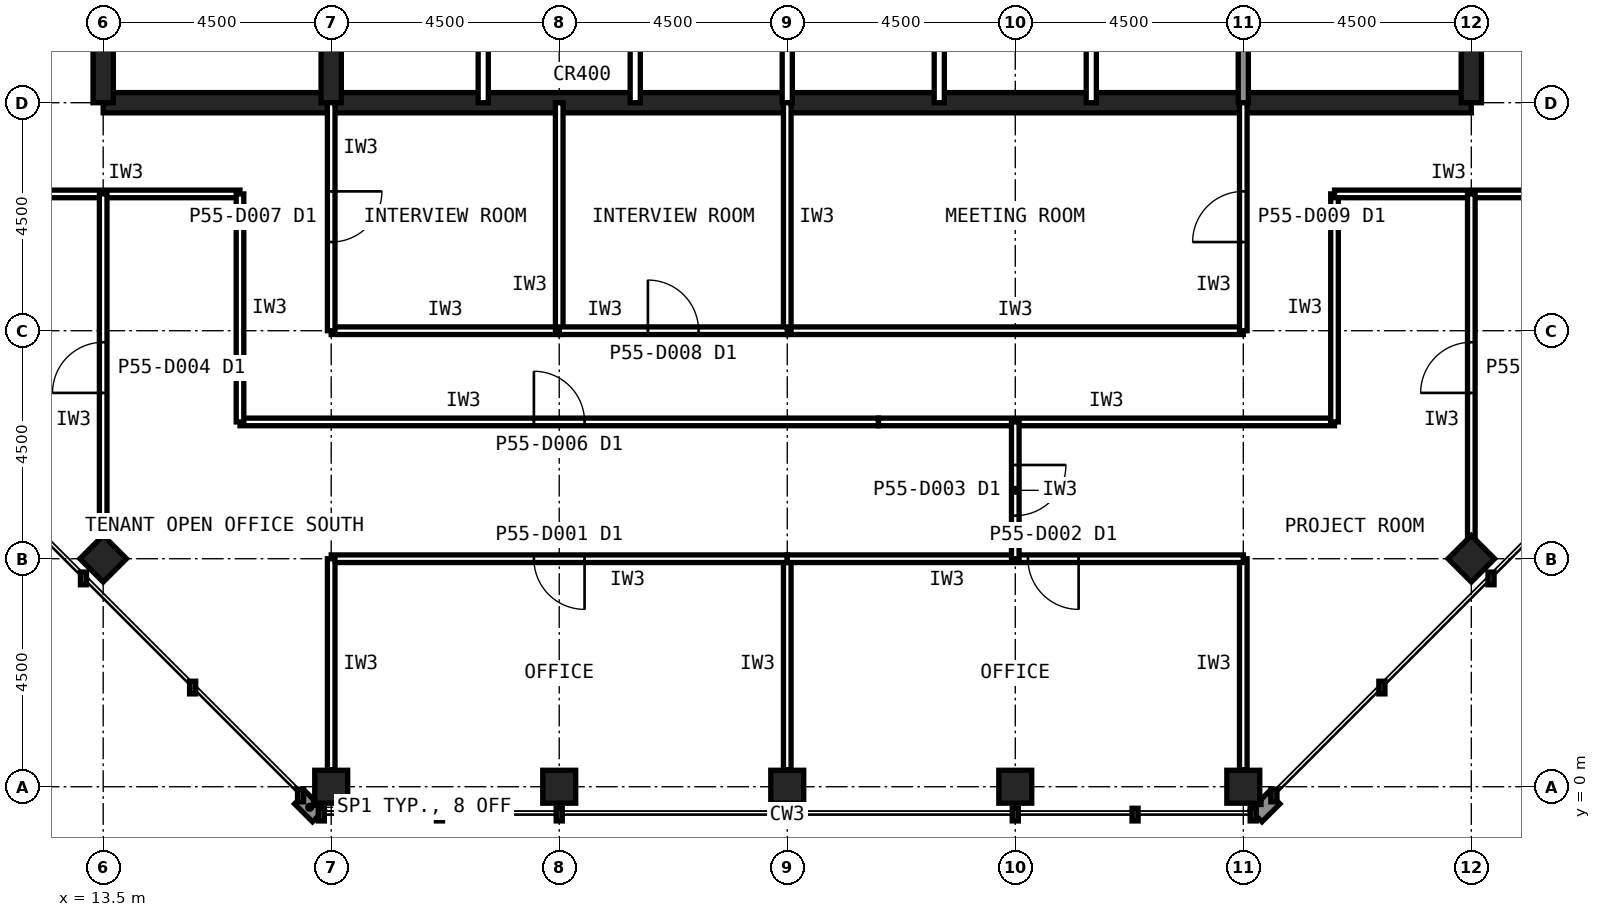
"""IFC4 building model, lengths in metres.
Left out: names, types, materials, properties, quantities, classifications, styles, units other than length and angle.
Written with IfcOpenShell. Run it as: python <this file> out.ifc"""

import sys

from ifc_helpers import new_model, si_unit, direction, frame, frame_2d, origin, origin_2d, place, context, subcontext, project, spatial, rectangle, hollow_rectangle, extrude, element, fill, save


model = new_model("IFC4")
c1 = context("Model", 3, precision=1e-05, world=origin(), true_north=direction((0.0, 1.0)))
c2 = subcontext(c1, "Body", "Model", "MODEL_VIEW")
j1 = project(units=[si_unit("LENGTHUNIT", "METRE"), si_unit("PLANEANGLEUNIT", "RADIAN")], contexts=[c1])
p1 = place(None, origin())
s1 = spatial("IfcSite", under=j1, at=p1, CompositionType="ELEMENT")
p2 = place(p1, origin())
s2 = spatial("IfcBuilding", under=s1, at=p2, CompositionType="ELEMENT")
p3 = place(p2, frame((0.0, 0.0, 230.6)))
s3 = spatial("IfcBuildingStorey", under=s2, at=p3, CompositionType="ELEMENT", Elevation=230.6)
for number, where, z_axis, x_axis in (
    (1, (18.0, 0.0, 0.0), (0.0, 0.0, 1.0), (1.0, 0.0, 0.0)),
    (2, (22.5, 0.0, 0.0), (0.0, 0.0, 1.0), (1.0, 0.0, 0.0)),
    (3, (27.0, 0.0, 0.0), (0.0, 0.0, 1.0), (1.0, 0.0, 0.0)),
    (4, (31.5, 0.0, 0.0), (0.0, 0.0, 1.0), (1.0, 0.0, 0.0)),
    (5, (36.0, 0.0, 0.0), (0.0, 0.0, 1.0), (1.0, 0.0, 0.0)),
    (6, (13.5, 4.5, 0.0), (0.0, 0.0, 1.0), (0.707, 0.707, 0.0)),
    (7, (40.5, 4.5, 0.0), (0.0, 0.0, 1.0), (0.707, 0.707, 0.0)),
):
    element("IfcColumn", number, at=place(p3, frame(where, z_axis=z_axis, x_axis=x_axis)), inside=s3, PredefinedType="COLUMN", context=c2, shape_type="SweptSolid", body=[
        extrude(hollow_rectangle(XDim=0.65, YDim=0.65, WallThickness=0.032, at=origin_2d()), origin(), (0.0, 0.0, 1.0), 4.0),
    ])
p4 = place(p3, frame((13.5, 13.5, 0.0), z_axis=(0.0, 0.0, 1.0), x_axis=(1.0, 0.0, 0.0)))
e8 = element("IfcWall", 8, at=p4, inside=s3, PredefinedType="SHEAR", context=c2, shape_type="SweptSolid", body=[
    extrude(rectangle(XDim=27.0, YDim=0.4, at=frame_2d((13.5, 0.0))), origin(), (0.0, 0.0, 1.0), 4.0),
])
p5 = place(p3, frame((40.5, 13.5, 0.0), z_axis=(0.0, 0.0, 1.0), x_axis=(0.0, 1.0, 0.0)))
e9 = element("IfcWall", 9, at=p5, inside=s3, PredefinedType="SHEAR", context=c2, shape_type="SweptSolid", body=[
    extrude(rectangle(XDim=27.0, YDim=0.4, at=frame_2d((13.5, 0.0))), origin(), (0.0, 0.0, 1.0), 4.0),
])
p6 = place(p5, frame((5.85, 0.0, 0.0)))
e10 = element("IfcOpeningElement", 10, at=p6, cuts=e9, PredefinedType="OPENING", context=c2, shape_type="SweptSolid", body=[
    extrude(rectangle(XDim=1.8, YDim=2.1, at=frame_2d((0.9, 1.05))), frame((0.0, 0.21, 0.0), z_axis=(0.0, -1.0, 0.0), x_axis=(1.0, 0.0, 0.0)), (0.0, 0.0, 1.0), 0.42),
])
p7 = place(p5, frame((19.65, 0.0, 0.0)))
e11 = element("IfcOpeningElement", 11, at=p7, cuts=e9, PredefinedType="OPENING", context=c2, shape_type="SweptSolid", body=[
    extrude(rectangle(XDim=1.2, YDim=2.1, at=frame_2d((0.6, 1.05))), frame((0.0, 0.21, 0.0), z_axis=(0.0, -1.0, 0.0), x_axis=(1.0, 0.0, 0.0)), (0.0, 0.0, 1.0), 0.42),
])
p8 = place(p3, frame((13.5, 40.5, 0.0), z_axis=(0.0, 0.0, 1.0), x_axis=(0.0, -1.0, 0.0)))
e12 = element("IfcWall", 12, at=p8, inside=s3, PredefinedType="SHEAR", context=c2, shape_type="SweptSolid", body=[
    extrude(rectangle(XDim=27.0, YDim=0.4, at=frame_2d((13.5, 0.0))), origin(), (0.0, 0.0, 1.0), 4.0),
])
p9 = place(p8, frame((19.65, 0.0, 0.0)))
e13 = element("IfcOpeningElement", 13, at=p9, cuts=e12, PredefinedType="OPENING", context=c2, shape_type="SweptSolid", body=[
    extrude(rectangle(XDim=1.2, YDim=2.1, at=frame_2d((0.6, 1.05))), frame((0.0, 0.21, 0.0), z_axis=(0.0, -1.0, 0.0), x_axis=(1.0, 0.0, 0.0)), (0.0, 0.0, 1.0), 0.42),
])
p10 = place(p8, frame((5.85, 0.0, 0.0)))
e14 = element("IfcOpeningElement", 14, at=p10, cuts=e12, PredefinedType="OPENING", context=c2, shape_type="SweptSolid", body=[
    extrude(rectangle(XDim=1.8, YDim=2.1, at=frame_2d((0.9, 1.05))), frame((0.0, 0.21, 0.0), z_axis=(0.0, -1.0, 0.0), x_axis=(1.0, 0.0, 0.0)), (0.0, 0.0, 1.0), 0.42),
])
p11 = place(p3, frame((18.0, 13.5, 0.0), z_axis=(0.0, 0.0, 1.0), x_axis=(0.0, 1.0, 0.0)))
e15 = element("IfcWall", 15, at=p11, inside=s3, PredefinedType="SHEAR", context=c2, shape_type="SweptSolid", body=[
    extrude(rectangle(XDim=18.0, YDim=0.4, at=frame_2d((9.0, 0.0))), origin(), (0.0, 0.0, 1.0), 4.0),
])
p12 = place(p3, frame((36.0, 13.5, 0.0), z_axis=(0.0, 0.0, 1.0), x_axis=(0.0, 1.0, 0.0)))
e16 = element("IfcWall", 16, at=p12, inside=s3, PredefinedType="SOLIDWALL", context=c2, shape_type="SweptSolid", body=[
    extrude(rectangle(XDim=4.5, YDim=0.2, at=frame_2d((2.25, 0.0))), origin(), (0.0, 0.0, 1.0), 3.84),
])
for number, where, z_axis, x_axis in (
    (17, (21.0, 13.5, 0.0), (0.0, 0.0, 1.0), (0.0, 1.0, 0.0)),
    (18, (24.0, 13.5, 0.0), (0.0, 0.0, 1.0), (0.0, 1.0, 0.0)),
    (19, (27.0, 13.5, 0.0), (0.0, 0.0, 1.0), (0.0, 1.0, 0.0)),
    (20, (30.0, 13.5, 0.0), (0.0, 0.0, 1.0), (0.0, 1.0, 0.0)),
    (21, (33.0, 13.5, 0.0), (0.0, 0.0, 1.0), (0.0, 1.0, 0.0)),
):
    element("IfcWall", number, at=place(p3, frame(where, z_axis=z_axis, x_axis=x_axis)), inside=s3, PredefinedType="PARTITIONING", context=c2, shape_type="SweptSolid", body=[
        extrude(rectangle(XDim=4.5, YDim=0.2, at=frame_2d((2.25, 0.0))), origin(), (0.0, 0.0, 1.0), 3.84),
    ])
p13 = place(p3, frame((16.2, 7.2, 0.0), z_axis=(0.0, 0.0, 1.0), x_axis=(1.0, 0.0, 0.0)))
e22 = element("IfcWall", 22, at=p13, inside=s3, PredefinedType="PARTITIONING", context=c2, shape_type="SweptSolid", body=[
    extrude(rectangle(XDim=12.6, YDim=0.15, at=frame_2d((6.3, 0.0))), origin(), (0.0, 0.0, 1.0), 3.84),
])
p14 = place(p13, frame((5.8, 0.0, 0.0)))
e23 = element("IfcOpeningElement", 23, at=p14, cuts=e22, PredefinedType="OPENING", context=c2, shape_type="SweptSolid", body=[
    extrude(rectangle(XDim=1.0, YDim=2.1, at=frame_2d((0.5, 1.05))), frame((0.0, 0.085, 0.0), z_axis=(0.0, -1.0, 0.0), x_axis=(1.0, 0.0, 0.0)), (0.0, 0.0, 1.0), 0.17),
])
p15 = place(p3, frame((28.8, 7.2, 0.0), z_axis=(0.0, 0.0, 1.0), x_axis=(1.0, 0.0, 0.0)))
e24 = element("IfcWall", 24, at=p15, inside=s3, PredefinedType="PARTITIONING", context=c2, shape_type="SweptSolid", body=[
    extrude(rectangle(XDim=9.0, YDim=0.15, at=frame_2d((4.5, 0.0))), origin(), (0.0, 0.0, 1.0), 3.84),
])
for number, where, z_axis, x_axis in (
    (25, (11.7, 11.7, 0.0), (0.0, 0.0, 1.0), (1.0, 0.0, 0.0)),
    (26, (16.2, 11.7, 0.0), (0.0, 0.0, 1.0), (0.0, -1.0, 0.0)),
    (27, (37.8, 7.2, 0.0), (0.0, 0.0, 1.0), (0.0, 1.0, 0.0)),
    (28, (37.8, 11.7, 0.0), (0.0, 0.0, 1.0), (1.0, 0.0, 0.0)),
):
    element("IfcWall", number, at=place(p3, frame(where, z_axis=z_axis, x_axis=x_axis)), inside=s3, PredefinedType="PARTITIONING", context=c2, shape_type="SweptSolid", body=[
        extrude(rectangle(XDim=4.5, YDim=0.15, at=frame_2d((2.25, 0.0))), origin(), (0.0, 0.0, 1.0), 3.84),
    ])
p16 = place(p3, frame((27.0, 9.0, 0.0), z_axis=(0.0, 0.0, 1.0), x_axis=(1.0, 0.0, 0.0)))
e29 = element("IfcWall", 29, at=p16, inside=s3, PredefinedType="PARTITIONING", context=c2, shape_type="SweptSolid", body=[
    extrude(rectangle(XDim=9.0, YDim=0.15, at=frame_2d((4.5, 0.0))), origin(), (0.0, 0.0, 1.0), 3.84),
])
p17 = place(p3, frame((36.0, 9.0, 0.0), z_axis=(0.0, 0.0, 1.0), x_axis=(0.0, 1.0, 0.0)))
e30 = element("IfcWall", 30, at=p17, inside=s3, PredefinedType="PARTITIONING", context=c2, shape_type="SweptSolid", body=[
    extrude(rectangle(XDim=4.5, YDim=0.15, at=frame_2d((2.25, 0.0))), origin(), (0.0, 0.0, 1.0), 2.989),
])
p18 = place(p17, frame((1.75, 0.0, 0.0)))
e31 = element("IfcOpeningElement", 31, at=p18, cuts=e30, PredefinedType="OPENING", context=c2, shape_type="SweptSolid", body=[
    extrude(rectangle(XDim=1.0, YDim=2.1, at=frame_2d((0.5, 1.05))), frame((0.0, 0.085, 0.0), z_axis=(0.0, -1.0, 0.0), x_axis=(1.0, 0.0, 0.0)), (0.0, 0.0, 1.0), 0.17),
])
p19 = place(p3, frame((27.0, 13.5, 0.0), z_axis=(0.0, 0.0, 1.0), x_axis=(0.0, -1.0, 0.0)))
e32 = element("IfcWall", 32, at=p19, inside=s3, PredefinedType="PARTITIONING", context=c2, shape_type="SweptSolid", body=[
    extrude(rectangle(XDim=4.5, YDim=0.15, at=frame_2d((2.25, 0.0))), origin(), (0.0, 0.0, 1.0), 2.989),
])
p20 = place(p3, frame((27.0, 0.335, 0.0), z_axis=(0.0, 0.0, 1.0), x_axis=(0.0, 1.0, 0.0)))
e33 = element("IfcWall", 33, at=p20, inside=s3, PredefinedType="PARTITIONING", context=c2, shape_type="SweptSolid", body=[
    extrude(rectangle(XDim=4.165, YDim=0.15, at=frame_2d((2.083, 0.0))), origin(), (0.0, 0.0, 1.0), 2.989),
])
p21 = place(p3, frame((27.0, 4.5, 0.0), z_axis=(0.0, 0.0, 1.0), x_axis=(-1.0, 0.0, 0.0)))
e34 = element("IfcWall", 34, at=p21, inside=s3, PredefinedType="PARTITIONING", context=c2, shape_type="SweptSolid", body=[
    extrude(rectangle(XDim=9.0, YDim=0.15, at=frame_2d((4.5, 0.0))), origin(), (0.0, 0.0, 1.0), 3.84),
])
p22 = place(p21, frame((4.0, 0.0, 0.0)))
e35 = element("IfcOpeningElement", 35, at=p22, cuts=e34, PredefinedType="OPENING", context=c2, shape_type="SweptSolid", body=[
    extrude(rectangle(XDim=1.0, YDim=2.1, at=frame_2d((0.5, 1.05))), frame((0.0, 0.085, 0.0), z_axis=(0.0, -1.0, 0.0), x_axis=(1.0, 0.0, 0.0)), (0.0, 0.0, 1.0), 0.17),
])
for number, where, z_axis, x_axis in (
    (36, (18.0, 4.5, 0.0), (0.0, 0.0, 1.0), (0.0, -1.0, 0.0)),
    (37, (36.0, 0.335, 0.0), (0.0, 0.0, 1.0), (0.0, 1.0, 0.0)),
):
    element("IfcWall", number, at=place(p3, frame(where, z_axis=z_axis, x_axis=x_axis)), inside=s3, PredefinedType="PARTITIONING", context=c2, shape_type="SweptSolid", body=[
        extrude(rectangle(XDim=4.165, YDim=0.15, at=frame_2d((2.083, 0.0))), origin(), (0.0, 0.0, 1.0), 2.989),
    ])
p23 = place(p3, frame((36.0, 4.5, 0.0), z_axis=(0.0, 0.0, 1.0), x_axis=(-1.0, 0.0, 0.0)))
e38 = element("IfcWall", 38, at=p23, inside=s3, PredefinedType="PARTITIONING", context=c2, shape_type="SweptSolid", body=[
    extrude(rectangle(XDim=9.0, YDim=0.15, at=frame_2d((4.5, 0.0))), origin(), (0.0, 0.0, 1.0), 3.84),
])
p24 = place(p23, frame((3.25, 0.0, 0.0)))
e39 = element("IfcOpeningElement", 39, at=p24, cuts=e38, PredefinedType="OPENING", context=c2, shape_type="SweptSolid", body=[
    extrude(rectangle(XDim=1.0, YDim=2.1, at=frame_2d((0.5, 1.05))), frame((0.0, 0.085, 0.0), z_axis=(0.0, -1.0, 0.0), x_axis=(1.0, 0.0, 0.0)), (0.0, 0.0, 1.0), 0.17),
])
p25 = place(p3, frame((18.0, 9.0, 0.0), z_axis=(0.0, 0.0, 1.0), x_axis=(1.0, 0.0, 0.0)))
e40 = element("IfcWall", 40, at=p25, inside=s3, PredefinedType="PARTITIONING", context=c2, shape_type="SweptSolid", body=[
    extrude(rectangle(XDim=4.5, YDim=0.15, at=frame_2d((2.25, 0.0))), origin(), (0.0, 0.0, 1.0), 3.84),
])
p26 = place(p3, frame((22.5, 9.0, 0.0), z_axis=(0.0, 0.0, 1.0), x_axis=(0.0, 1.0, 0.0)))
e41 = element("IfcWall", 41, at=p26, inside=s3, PredefinedType="PARTITIONING", context=c2, shape_type="SweptSolid", body=[
    extrude(rectangle(XDim=4.5, YDim=0.15, at=frame_2d((2.25, 0.0))), origin(), (0.0, 0.0, 1.0), 2.989),
])
p27 = place(p3, frame((18.0, 13.5, 0.0), z_axis=(0.0, 0.0, 1.0), x_axis=(0.0, -1.0, 0.0)))
e42 = element("IfcWall", 42, at=p27, inside=s3, PredefinedType="PARTITIONING", context=c2, shape_type="SweptSolid", body=[
    extrude(rectangle(XDim=4.5, YDim=0.15, at=frame_2d((2.25, 0.0))), origin(), (0.0, 0.0, 1.0), 2.989),
])
p28 = place(p27, frame((1.75, 0.0, 0.0)))
e43 = element("IfcOpeningElement", 43, at=p28, cuts=e42, PredefinedType="OPENING", context=c2, shape_type="SweptSolid", body=[
    extrude(rectangle(XDim=1.0, YDim=2.1, at=frame_2d((0.5, 1.05))), frame((0.0, 0.085, 0.0), z_axis=(0.0, -1.0, 0.0), x_axis=(1.0, 0.0, 0.0)), (0.0, 0.0, 1.0), 0.17),
])
p29 = place(p3, frame((22.5, 9.0, 0.0), z_axis=(0.0, 0.0, 1.0), x_axis=(1.0, 0.0, 0.0)))
e44 = element("IfcWall", 44, at=p29, inside=s3, PredefinedType="PARTITIONING", context=c2, shape_type="SweptSolid", body=[
    extrude(rectangle(XDim=4.5, YDim=0.15, at=frame_2d((2.25, 0.0))), origin(), (0.0, 0.0, 1.0), 3.84),
])
p30 = place(p29, frame((1.75, 0.0, 0.0)))
e45 = element("IfcOpeningElement", 45, at=p30, cuts=e44, PredefinedType="OPENING", context=c2, shape_type="SweptSolid", body=[
    extrude(rectangle(XDim=1.0, YDim=2.1, at=frame_2d((0.5, 1.05))), frame((0.0, 0.085, 0.0), z_axis=(0.0, -1.0, 0.0), x_axis=(1.0, 0.0, 0.0)), (0.0, 0.0, 1.0), 0.17),
])
p31 = place(p3, frame((13.5, 4.845, 0.0), z_axis=(0.0, 0.0, 1.0), x_axis=(0.0, 1.0, 0.0)))
e46 = element("IfcWall", 46, at=p31, inside=s3, PredefinedType="PARTITIONING", context=c2, shape_type="SweptSolid", body=[
    extrude(rectangle(XDim=6.855, YDim=0.15, at=frame_2d((3.427, 0.0))), origin(), (0.0, 0.0, 1.0), 2.989),
])
p32 = place(p31, frame((2.927, 0.0, 0.0)))
e47 = element("IfcOpeningElement", 47, at=p32, cuts=e46, PredefinedType="OPENING", context=c2, shape_type="SweptSolid", body=[
    extrude(rectangle(XDim=1.0, YDim=2.1, at=frame_2d((0.5, 1.05))), frame((0.0, 0.085, 0.0), z_axis=(0.0, -1.0, 0.0), x_axis=(1.0, 0.0, 0.0)), (0.0, 0.0, 1.0), 0.17),
])
p33 = place(p3, frame((31.5, 7.2, 0.0), z_axis=(0.0, 0.0, 1.0), x_axis=(0.0, -1.0, 0.0)))
e48 = element("IfcWall", 48, at=p33, inside=s3, PredefinedType="PARTITIONING", context=c2, shape_type="SweptSolid", body=[
    extrude(rectangle(XDim=2.7, YDim=0.15, at=frame_2d((1.35, 0.0))), origin(), (0.0, 0.0, 1.0), 2.989),
])
p34 = place(p33, frame((0.85, 0.0, 0.0)))
e49 = element("IfcOpeningElement", 49, at=p34, cuts=e48, PredefinedType="OPENING", context=c2, shape_type="SweptSolid", body=[
    extrude(rectangle(XDim=1.0, YDim=2.1, at=frame_2d((0.5, 1.05))), frame((0.0, 0.085, 0.0), z_axis=(0.0, -1.0, 0.0), x_axis=(1.0, 0.0, 0.0)), (0.0, 0.0, 1.0), 0.17),
])
p35 = place(p3, frame((40.5, 4.845, 0.0), z_axis=(0.0, 0.0, 1.0), x_axis=(0.0, 1.0, 0.0)))
e50 = element("IfcWall", 50, at=p35, inside=s3, PredefinedType="PARTITIONING", context=c2, shape_type="SweptSolid", body=[
    extrude(rectangle(XDim=6.855, YDim=0.15, at=frame_2d((3.427, 0.0))), origin(), (0.0, 0.0, 1.0), 2.989),
])
p36 = place(p35, frame((2.927, 0.0, 0.0)))
e51 = element("IfcOpeningElement", 51, at=p36, cuts=e50, PredefinedType="OPENING", context=c2, shape_type="SweptSolid", body=[
    extrude(rectangle(XDim=1.0, YDim=2.1, at=frame_2d((0.5, 1.05))), frame((0.0, 0.085, 0.0), z_axis=(0.0, -1.0, 0.0), x_axis=(1.0, 0.0, 0.0)), (0.0, 0.0, 1.0), 0.17),
])
p37 = place(p14, origin())
e52 = element("IfcDoor", 52, at=p37, inside=s3, OperationType="SINGLE_SWING_LEFT", PredefinedType="DOOR", context=c2, shape_type="SweptSolid", body=[
    extrude(rectangle(XDim=1.0, YDim=2.1, at=frame_2d((0.5, 1.05))), frame((0.0, 0.025, 0.0), z_axis=(0.0, -1.0, 0.0), x_axis=(1.0, 0.0, 0.0)), (0.0, 0.0, 1.0), 0.05),
])
fill(e23, e52)
p38 = place(p18, origin())
e53 = element("IfcDoor", 53, at=p38, inside=s3, OperationType="SINGLE_SWING_LEFT", PredefinedType="DOOR", context=c2, shape_type="SweptSolid", body=[
    extrude(rectangle(XDim=1.0, YDim=2.1, at=frame_2d((0.5, 1.05))), frame((0.0, 0.025, 0.0), z_axis=(0.0, -1.0, 0.0), x_axis=(1.0, 0.0, 0.0)), (0.0, 0.0, 1.0), 0.05),
])
fill(e31, e53)
p39 = place(p22, origin())
e54 = element("IfcDoor", 54, at=p39, inside=s3, OperationType="SINGLE_SWING_LEFT", PredefinedType="DOOR", context=c2, shape_type="SweptSolid", body=[
    extrude(rectangle(XDim=1.0, YDim=2.1, at=frame_2d((0.5, 1.05))), frame((0.0, 0.025, 0.0), z_axis=(0.0, -1.0, 0.0), x_axis=(1.0, 0.0, 0.0)), (0.0, 0.0, 1.0), 0.05),
])
fill(e35, e54)
p40 = place(p24, origin())
e55 = element("IfcDoor", 55, at=p40, inside=s3, OperationType="SINGLE_SWING_LEFT", PredefinedType="DOOR", context=c2, shape_type="SweptSolid", body=[
    extrude(rectangle(XDim=1.0, YDim=2.1, at=frame_2d((0.5, 1.05))), frame((0.0, 0.025, 0.0), z_axis=(0.0, -1.0, 0.0), x_axis=(1.0, 0.0, 0.0)), (0.0, 0.0, 1.0), 0.05),
])
fill(e39, e55)
p41 = place(p28, origin())
e56 = element("IfcDoor", 56, at=p41, inside=s3, OperationType="SINGLE_SWING_LEFT", PredefinedType="DOOR", context=c2, shape_type="SweptSolid", body=[
    extrude(rectangle(XDim=1.0, YDim=2.1, at=frame_2d((0.5, 1.05))), frame((0.0, 0.025, 0.0), z_axis=(0.0, -1.0, 0.0), x_axis=(1.0, 0.0, 0.0)), (0.0, 0.0, 1.0), 0.05),
])
fill(e43, e56)
p42 = place(p30, origin())
e57 = element("IfcDoor", 57, at=p42, inside=s3, OperationType="SINGLE_SWING_LEFT", PredefinedType="DOOR", context=c2, shape_type="SweptSolid", body=[
    extrude(rectangle(XDim=1.0, YDim=2.1, at=frame_2d((0.5, 1.05))), frame((0.0, 0.025, 0.0), z_axis=(0.0, -1.0, 0.0), x_axis=(1.0, 0.0, 0.0)), (0.0, 0.0, 1.0), 0.05),
])
fill(e45, e57)
p43 = place(p32, origin())
e58 = element("IfcDoor", 58, at=p43, inside=s3, OperationType="SINGLE_SWING_LEFT", PredefinedType="DOOR", context=c2, shape_type="SweptSolid", body=[
    extrude(rectangle(XDim=1.0, YDim=2.1, at=frame_2d((0.5, 1.05))), frame((0.0, 0.025, 0.0), z_axis=(0.0, -1.0, 0.0), x_axis=(1.0, 0.0, 0.0)), (0.0, 0.0, 1.0), 0.05),
])
fill(e47, e58)
p44 = place(p34, origin())
e59 = element("IfcDoor", 59, at=p44, inside=s3, OperationType="SINGLE_SWING_LEFT", PredefinedType="DOOR", context=c2, shape_type="SweptSolid", body=[
    extrude(rectangle(XDim=1.0, YDim=2.1, at=frame_2d((0.5, 1.05))), frame((0.0, 0.025, 0.0), z_axis=(0.0, -1.0, 0.0), x_axis=(1.0, 0.0, 0.0)), (0.0, 0.0, 1.0), 0.05),
])
fill(e49, e59)
p45 = place(p36, origin())
e60 = element("IfcDoor", 60, at=p45, inside=s3, OperationType="SINGLE_SWING_LEFT", PredefinedType="DOOR", context=c2, shape_type="SweptSolid", body=[
    extrude(rectangle(XDim=1.0, YDim=2.1, at=frame_2d((0.5, 1.05))), frame((0.0, 0.025, 0.0), z_axis=(0.0, -1.0, 0.0), x_axis=(1.0, 0.0, 0.0)), (0.0, 0.0, 1.0), 0.05),
])
fill(e51, e60)
save(model, sys.argv[1])
